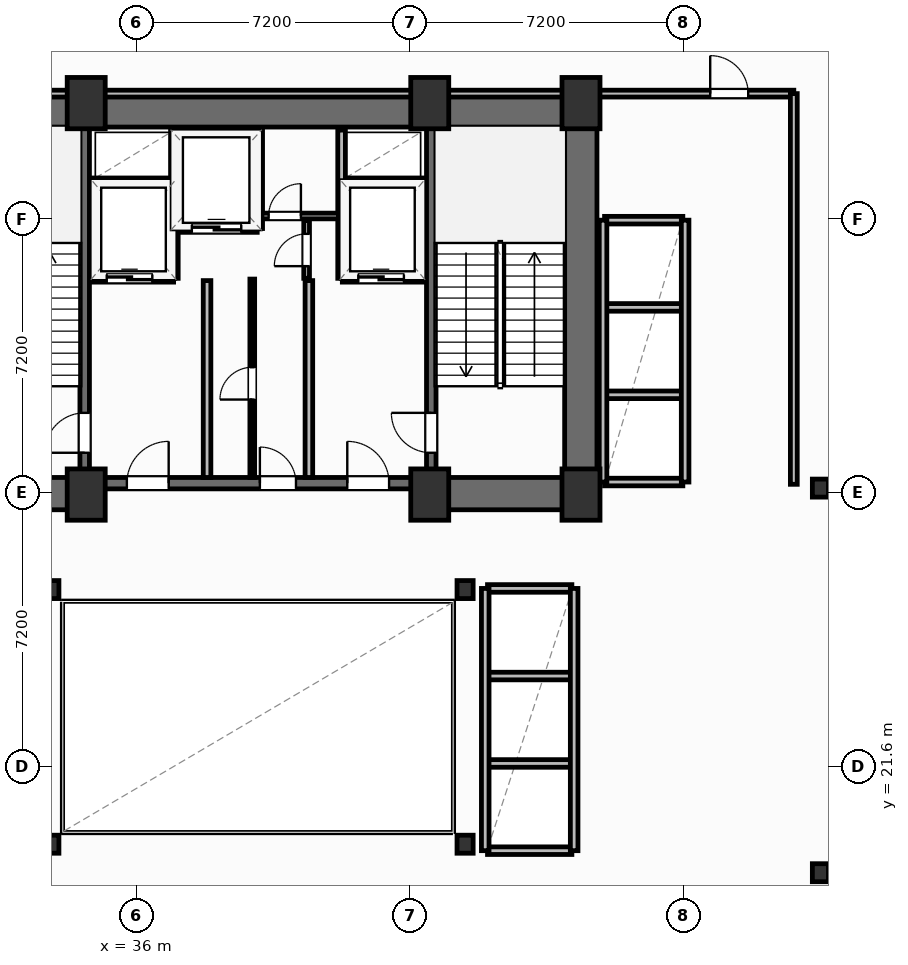
"""IFC4 building model, lengths in metres.
Left out: names, types, materials, properties, quantities, classifications, styles, units other than length and angle.
Written with IfcOpenShell. Run it as: python <this file> out.ifc"""

import sys

from ifc_helpers import new_model, si_unit, direction, frame, frame_2d, origin, origin_2d, place, context, subcontext, project, spatial, rectangle, i_section, extrude, element, fill, save


model = new_model("IFC4")
c1 = context("Model", 3, precision=1e-05, world=origin(), true_north=direction((0.0, 1.0)))
c2 = subcontext(c1, "Body", "Model", "MODEL_VIEW")
j1 = project(units=[si_unit("LENGTHUNIT", "METRE"), si_unit("PLANEANGLEUNIT", "RADIAN")], contexts=[c1])
p1 = place(None, origin())
s1 = spatial("IfcSite", under=j1, at=p1, CompositionType="ELEMENT")
p2 = place(p1, origin())
s2 = spatial("IfcBuilding", under=s1, at=p2, CompositionType="ELEMENT")
p3 = place(p2, frame((0.0, 0.0, 71.4)))
s3 = spatial("IfcBuildingStorey", under=s2, at=p3, CompositionType="ELEMENT", Elevation=71.4)
for number, where, z_axis, x_axis in (
    (1, (34.68, 28.75, 0.0), (0.0, 0.0, 1.0), (1.0, 0.0, 0.0)),
    (2, (43.72, 28.75, 0.0), (0.0, 0.0, 1.0), (1.0, 0.0, 0.0)),
    (3, (47.7, 28.75, 0.0), (0.0, 0.0, 1.0), (1.0, 0.0, 0.0)),
    (4, (34.68, 39.05, 0.0), (0.0, 0.0, 1.0), (1.0, 0.0, 0.0)),
    (5, (43.72, 39.05, 0.0), (0.0, 0.0, 1.0), (1.0, 0.0, 0.0)),
    (6, (47.7, 39.05, 0.0), (0.0, 0.0, 1.0), (1.0, 0.0, 0.0)),
):
    element("IfcColumn", number, at=place(p3, frame(where, z_axis=z_axis, x_axis=x_axis)), inside=s3, PredefinedType="COLUMN", context=c2, shape_type="SweptSolid", body=[
        extrude(rectangle(XDim=1.0, YDim=1.35, at=origin_2d()), origin(), (0.0, 0.0, 1.0), 4.8),
    ])
for number, where, z_axis, x_axis in (
    (7, (33.75, 19.55, 0.0), (0.0, 0.0, 1.0), (1.0, 0.0, 0.0)),
    (8, (44.65, 19.55, 0.0), (0.0, 0.0, 1.0), (1.0, 0.0, 0.0)),
    (9, (33.75, 26.25, 0.0), (0.0, 0.0, 1.0), (1.0, 0.0, 0.0)),
    (10, (44.65, 26.25, 0.0), (0.0, 0.0, 1.0), (1.0, 0.0, 0.0)),
    (11, (54.0, 18.8, 0.0), (0.0, 0.0, 1.0), (1.0, 0.0, 0.0)),
    (12, (54.0, 28.92, 0.0), (0.0, 0.0, 1.0), (1.0, 0.0, 0.0)),
):
    element("IfcColumn", number, at=place(p3, frame(where, z_axis=z_axis, x_axis=x_axis)), inside=s3, PredefinedType="COLUMN", context=c2, shape_type="SweptSolid", body=[
        extrude(i_section(OverallWidth=0.424, OverallDepth=0.474, WebThickness=0.048, FlangeThickness=0.077, FilletRadius=0.025, at=origin_2d()), origin(), (0.0, 0.0, 1.0), 4.8),
    ])
p4 = place(p3, frame((30.28, 38.845, 0.0), z_axis=(0.0, 0.0, 1.0), x_axis=(1.0, 0.0, 0.0)))
e13 = element("IfcWall", 13, at=p4, inside=s3, PredefinedType="SHEAR", context=c2, shape_type="SweptSolid", body=[
    extrude(rectangle(XDim=17.84, YDim=0.85, at=frame_2d((8.92, 0.0))), origin(), (0.0, 0.0, 1.0), 4.55),
])
p5 = place(p3, frame((47.695, 29.2, 0.0), z_axis=(0.0, 0.0, 1.0), x_axis=(0.0, 1.0, 0.0)))
e14 = element("IfcWall", 14, at=p5, inside=s3, PredefinedType="SHEAR", context=c2, shape_type="SweptSolid", body=[
    extrude(rectangle(XDim=9.22, YDim=0.85, at=frame_2d((4.61, 0.0))), origin(), (0.0, 0.0, 1.0), 4.55),
])
for number, where, z_axis, x_axis in (
    (15, (30.28, 28.775, 0.0), (0.0, 0.0, 1.0), (1.0, 0.0, 0.0)),
    (16, (43.6, 28.775, 0.0), (0.0, 0.0, 1.0), (1.0, 0.0, 0.0)),
):
    element("IfcWall", number, at=place(p3, frame(where, z_axis=z_axis, x_axis=x_axis)), inside=s3, PredefinedType="SHEAR", context=c2, shape_type="SweptSolid", body=[
        extrude(rectangle(XDim=4.52, YDim=0.85, at=frame_2d((2.26, 0.0))), origin(), (0.0, 0.0, 1.0), 4.55),
    ])
p6 = place(p3, frame((34.8, 29.05, 0.0), z_axis=(0.0, 0.0, 1.0), x_axis=(1.0, 0.0, 0.0)))
e17 = element("IfcWall", 17, at=p6, inside=s3, PredefinedType="SHEAR", context=c2, shape_type="SweptSolid", body=[
    extrude(rectangle(XDim=8.8, YDim=0.3, at=frame_2d((4.4, 0.0))), origin(), (0.0, 0.0, 1.0), 4.55),
])
p7 = place(p6, frame((0.95, 0.0, 0.0)))
e18 = element("IfcOpeningElement", 18, at=p7, cuts=e17, PredefinedType="OPENING", context=c2, shape_type="SweptSolid", body=[
    extrude(rectangle(XDim=1.1, YDim=2.15, at=frame_2d((0.55, 1.075))), frame((0.0, 0.16, 0.0), z_axis=(0.0, -1.0, 0.0), x_axis=(1.0, 0.0, 0.0)), (0.0, 0.0, 1.0), 0.32),
])
p8 = place(p6, frame((6.75, 0.0, 0.0)))
e19 = element("IfcOpeningElement", 19, at=p8, cuts=e17, PredefinedType="OPENING", context=c2, shape_type="SweptSolid", body=[
    extrude(rectangle(XDim=1.1, YDim=2.15, at=frame_2d((0.55, 1.075))), frame((0.0, 0.16, 0.0), z_axis=(0.0, -1.0, 0.0), x_axis=(1.0, 0.0, 0.0)), (0.0, 0.0, 1.0), 0.32),
])
p9 = place(p6, frame((4.45, 0.0, 0.0)))
e20 = element("IfcOpeningElement", 20, at=p9, cuts=e17, PredefinedType="OPENING", context=c2, shape_type="SweptSolid", body=[
    extrude(rectangle(XDim=0.95, YDim=2.15, at=frame_2d((0.475, 1.075))), frame((0.0, 0.16, 0.0), z_axis=(0.0, -1.0, 0.0), x_axis=(1.0, 0.0, 0.0)), (0.0, 0.0, 1.0), 0.32),
])
p10 = place(p3, frame((34.64, 29.2, 0.0), z_axis=(0.0, 0.0, 1.0), x_axis=(0.0, 1.0, 0.0)))
e21 = element("IfcWall", 21, at=p10, inside=s3, PredefinedType="SHEAR", context=c2, shape_type="SweptSolid", body=[
    extrude(rectangle(XDim=9.22, YDim=0.25, at=frame_2d((4.61, 0.0))), origin(), (0.0, 0.0, 1.0), 4.55),
])
p11 = place(p10, frame((0.65, 0.0, 0.0)))
e22 = element("IfcOpeningElement", 22, at=p11, cuts=e21, PredefinedType="OPENING", context=c2, shape_type="SweptSolid", body=[
    extrude(rectangle(XDim=1.05, YDim=2.15, at=frame_2d((0.525, 1.075))), frame((0.0, 0.135, 0.0), z_axis=(0.0, -1.0, 0.0), x_axis=(1.0, 0.0, 0.0)), (0.0, 0.0, 1.0), 0.27),
])
p12 = place(p3, frame((43.76, 29.2, 0.0), z_axis=(0.0, 0.0, 1.0), x_axis=(0.0, 1.0, 0.0)))
e23 = element("IfcWall", 23, at=p12, inside=s3, PredefinedType="SHEAR", context=c2, shape_type="SweptSolid", body=[
    extrude(rectangle(XDim=9.22, YDim=0.25, at=frame_2d((4.61, 0.0))), origin(), (0.0, 0.0, 1.0), 4.55),
])
p13 = place(p12, frame((0.65, 0.0, 0.0)))
e24 = element("IfcOpeningElement", 24, at=p13, cuts=e23, PredefinedType="OPENING", context=c2, shape_type="SweptSolid", body=[
    extrude(rectangle(XDim=1.05, YDim=2.15, at=frame_2d((0.525, 1.075))), frame((0.0, 0.135, 0.0), z_axis=(0.0, -1.0, 0.0), x_axis=(1.0, 0.0, 0.0)), (0.0, 0.0, 1.0), 0.27),
])
p14 = place(p3, frame((18.646, 55.739, 0.0), z_axis=(0.0, 0.0, 1.0), x_axis=(0.935222250741, -0.354061211825, 0.0)))
e25 = element("IfcWall", 25, at=p14, inside=s3, PredefinedType="SOLIDWALL", context=c2, shape_type="SweptSolid", body=[
    extrude(rectangle(XDim=60.0, YDim=0.22, at=frame_2d((30.0, 0.0))), origin(), (0.0, 0.0, 1.0), 3.83),
])
p15 = place(p14, frame((27.647, 0.0, 0.0)))
e26 = element("IfcOpeningElement", 26, at=p15, cuts=e25, PredefinedType="OPENING", context=c2, shape_type="SweptSolid", body=[
    extrude(rectangle(XDim=1.85, YDim=2.3, at=frame_2d((0.925, 1.15))), frame((0.0, 0.12, 0.0), z_axis=(0.0, -1.0, 0.0), x_axis=(1.0, 0.0, 0.0)), (0.0, 0.0, 1.0), 0.24),
])
p16 = place(p14, frame((0.55, 0.0, 0.75)))
e27 = element("IfcOpeningElement", 27, at=p16, cuts=e25, PredefinedType="OPENING", context=c2, shape_type="SweptSolid", body=[
    extrude(rectangle(XDim=1.65, YDim=1.65, at=frame_2d((0.825, 0.825))), frame((0.0, 0.12, 0.0), z_axis=(0.0, -1.0, 0.0), x_axis=(1.0, 0.0, 0.0)), (0.0, 0.0, 1.0), 0.24),
])
p17 = place(p14, frame((57.8, 0.0, 0.75)))
e28 = element("IfcOpeningElement", 28, at=p17, cuts=e25, PredefinedType="OPENING", context=c2, shape_type="SweptSolid", body=[
    extrude(rectangle(XDim=1.65, YDim=1.65, at=frame_2d((0.825, 0.825))), frame((0.0, 0.12, 0.0), z_axis=(0.0, -1.0, 0.0), x_axis=(1.0, 0.0, 0.0)), (0.0, 0.0, 1.0), 0.24),
])
p18 = place(p3, frame((20.0, 39.3, 0.0), z_axis=(0.0, 0.0, 1.0), x_axis=(1.0, 0.0, 0.0)))
e29 = element("IfcWall", 29, at=p18, inside=s3, PredefinedType="PARTITIONING", context=c2, shape_type="SweptSolid", body=[
    extrude(rectangle(XDim=33.3, YDim=0.18, at=frame_2d((16.65, 0.0))), origin(), (0.0, 0.0, 1.0), 3.68),
])
p19 = place(p18, frame((31.1, 0.0, 0.0)))
e30 = element("IfcOpeningElement", 30, at=p19, cuts=e29, PredefinedType="OPENING", context=c2, shape_type="SweptSolid", body=[
    extrude(rectangle(XDim=1.0, YDim=2.05, at=frame_2d((0.5, 1.025))), frame((0.0, 0.1, 0.0), z_axis=(0.0, -1.0, 0.0), x_axis=(1.0, 0.0, 0.0)), (0.0, 0.0, 1.0), 0.2),
])
p20 = place(p3, frame((53.3, 29.02, 0.0), z_axis=(0.0, 0.0, 1.0), x_axis=(0.0, 1.0, 0.0)))
e31 = element("IfcWall", 31, at=p20, inside=s3, PredefinedType="PARTITIONING", context=c2, shape_type="SweptSolid", body=[
    extrude(rectangle(XDim=10.28, YDim=0.18, at=frame_2d((5.14, 0.0))), origin(), (0.0, 0.0, 1.0), 4.55),
])
for number, where, z_axis, x_axis in (
    (32, (37.86, 29.2, 0.0), (0.0, 0.0, 1.0), (0.0, 1.0, 0.0)),
    (33, (40.54, 29.2, 0.0), (0.0, 0.0, 1.0), (0.0, 1.0, 0.0)),
):
    element("IfcWall", number, at=place(p3, frame(where, z_axis=z_axis, x_axis=x_axis)), inside=s3, PredefinedType="PARTITIONING", context=c2, shape_type="SweptSolid", body=[
        extrude(rectangle(XDim=5.18, YDim=0.2, at=frame_2d((2.59, 0.0))), origin(), (0.0, 0.0, 1.0), 4.55),
    ])
p21 = place(p3, frame((34.8, 34.44, 0.0), z_axis=(0.0, 0.0, 1.0), x_axis=(1.0, 0.0, 0.0)))
e34 = element("IfcWall", 34, at=p21, inside=s3, PredefinedType="PARTITIONING", context=c2, shape_type="SweptSolid", body=[
    extrude(rectangle(XDim=2.18, YDim=0.2, at=frame_2d((1.09, 0.0))), origin(), (0.0, 0.0, 1.0), 4.55),
])
p22 = place(p21, frame((0.42, 0.0, 0.0)))
e35 = element("IfcOpeningElement", 35, at=p22, cuts=e34, PredefinedType="OPENING", context=c2, shape_type="SweptSolid", body=[
    extrude(rectangle(XDim=1.2, YDim=2.2, at=frame_2d((0.6, 1.1))), frame((0.0, 0.11, 0.0), z_axis=(0.0, -1.0, 0.0), x_axis=(1.0, 0.0, 0.0)), (0.0, 0.0, 1.0), 0.22),
])
p23 = place(p3, frame((34.8, 36.98, 0.0), z_axis=(0.0, 0.0, 1.0), x_axis=(1.0, 0.0, 0.0)))
e36 = element("IfcWall", 36, at=p23, inside=s3, PredefinedType="PARTITIONING", context=c2, shape_type="SweptSolid", body=[
    extrude(rectangle(XDim=2.18, YDim=0.2, at=frame_2d((1.09, 0.0))), origin(), (0.0, 0.0, 1.0), 4.55),
])
p24 = place(p3, frame((37.0, 34.44, 0.0), z_axis=(0.0, 0.0, 1.0), x_axis=(0.0, 1.0, 0.0)))
e37 = element("IfcWall", 37, at=p24, inside=s3, PredefinedType="PARTITIONING", context=c2, shape_type="SweptSolid", body=[
    extrude(rectangle(XDim=3.9, YDim=0.2, at=frame_2d((1.95, 0.0))), origin(), (0.0, 0.0, 1.0), 4.55),
])
p25 = place(p3, frame((41.42, 34.44, 0.0), z_axis=(0.0, 0.0, 1.0), x_axis=(1.0, 0.0, 0.0)))
e38 = element("IfcWall", 38, at=p25, inside=s3, PredefinedType="PARTITIONING", context=c2, shape_type="SweptSolid", body=[
    extrude(rectangle(XDim=2.18, YDim=0.2, at=frame_2d((1.09, 0.0))), origin(), (0.0, 0.0, 1.0), 4.55),
])
p26 = place(p25, frame((0.42, 0.0, 0.0)))
e39 = element("IfcOpeningElement", 39, at=p26, cuts=e38, PredefinedType="OPENING", context=c2, shape_type="SweptSolid", body=[
    extrude(rectangle(XDim=1.2, YDim=2.2, at=frame_2d((0.6, 1.1))), frame((0.0, 0.11, 0.0), z_axis=(0.0, -1.0, 0.0), x_axis=(1.0, 0.0, 0.0)), (0.0, 0.0, 1.0), 0.22),
])
p27 = place(p3, frame((41.42, 36.98, 0.0), z_axis=(0.0, 0.0, 1.0), x_axis=(1.0, 0.0, 0.0)))
e40 = element("IfcWall", 40, at=p27, inside=s3, PredefinedType="PARTITIONING", context=c2, shape_type="SweptSolid", body=[
    extrude(rectangle(XDim=2.18, YDim=0.2, at=frame_2d((1.09, 0.0))), origin(), (0.0, 0.0, 1.0), 4.55),
])
p28 = place(p3, frame((41.4, 34.44, 0.0), z_axis=(0.0, 0.0, 1.0), x_axis=(0.0, 1.0, 0.0)))
e41 = element("IfcWall", 41, at=p28, inside=s3, PredefinedType="PARTITIONING", context=c2, shape_type="SweptSolid", body=[
    extrude(rectangle(XDim=3.9, YDim=0.2, at=frame_2d((1.95, 0.0))), origin(), (0.0, 0.0, 1.0), 4.55),
])
p29 = place(p3, frame((37.06, 35.75, 0.0), z_axis=(0.0, 0.0, 1.0), x_axis=(1.0, 0.0, 0.0)))
e42 = element("IfcWall", 42, at=p29, inside=s3, PredefinedType="PARTITIONING", context=c2, shape_type="SweptSolid", body=[
    extrude(rectangle(XDim=2.12, YDim=0.2, at=frame_2d((1.06, 0.0))), origin(), (0.0, 0.0, 1.0), 4.55),
])
p30 = place(p29, frame((0.4, 0.0, 0.0)))
e43 = element("IfcOpeningElement", 43, at=p30, cuts=e42, PredefinedType="OPENING", context=c2, shape_type="SweptSolid", body=[
    extrude(rectangle(XDim=1.3, YDim=2.2, at=frame_2d((0.65, 1.1))), frame((0.0, 0.11, 0.0), z_axis=(0.0, -1.0, 0.0), x_axis=(1.0, 0.0, 0.0)), (0.0, 0.0, 1.0), 0.22),
])
p31 = place(p3, frame((39.22, 35.75, 0.0), z_axis=(0.0, 0.0, 1.0), x_axis=(0.0, 1.0, 0.0)))
e44 = element("IfcWall", 44, at=p31, inside=s3, PredefinedType="PARTITIONING", context=c2, shape_type="SweptSolid", body=[
    extrude(rectangle(XDim=2.59, YDim=0.2, at=frame_2d((1.295, 0.0))), origin(), (0.0, 0.0, 1.0), 4.55),
])
p32 = place(p3, frame((39.3, 36.08, 0.0), z_axis=(0.0, 0.0, 1.0), x_axis=(1.0, 0.0, 0.0)))
e45 = element("IfcWall", 45, at=p32, inside=s3, PredefinedType="PARTITIONING", context=c2, shape_type="SweptSolid", body=[
    extrude(rectangle(XDim=2.02, YDim=0.15, at=frame_2d((1.01, 0.0))), origin(), (0.0, 0.0, 1.0), 4.55),
])
p33 = place(p32, frame((0.18, 0.0, 0.0)))
e46 = element("IfcOpeningElement", 46, at=p33, cuts=e45, PredefinedType="OPENING", context=c2, shape_type="SweptSolid", body=[
    extrude(rectangle(XDim=0.85, YDim=2.05, at=frame_2d((0.425, 1.025))), frame((0.0, 0.085, 0.0), z_axis=(0.0, -1.0, 0.0), x_axis=(1.0, 0.0, 0.0)), (0.0, 0.0, 1.0), 0.17),
])
p34 = place(p3, frame((40.48, 34.44, 0.0), z_axis=(0.0, 0.0, 1.0), x_axis=(0.0, 1.0, 0.0)))
e47 = element("IfcWall", 47, at=p34, inside=s3, PredefinedType="PARTITIONING", context=c2, shape_type="SweptSolid", body=[
    extrude(rectangle(XDim=1.52, YDim=0.15, at=frame_2d((0.76, 0.0))), origin(), (0.0, 0.0, 1.0), 4.55),
])
p35 = place(p34, frame((0.32, 0.0, 0.0)))
e48 = element("IfcOpeningElement", 48, at=p35, cuts=e47, PredefinedType="OPENING", context=c2, shape_type="SweptSolid", body=[
    extrude(rectangle(XDim=0.85, YDim=2.05, at=frame_2d((0.425, 1.025))), frame((0.0, 0.085, 0.0), z_axis=(0.0, -1.0, 0.0), x_axis=(1.0, 0.0, 0.0)), (0.0, 0.0, 1.0), 0.17),
])
p36 = place(p3, frame((39.05, 29.2, 0.0), z_axis=(0.0, 0.0, 1.0), x_axis=(0.0, 1.0, 0.0)))
e49 = element("IfcWall", 49, at=p36, inside=s3, PredefinedType="PARTITIONING", context=c2, shape_type="SweptSolid", body=[
    extrude(rectangle(XDim=5.22, YDim=0.125, at=frame_2d((2.61, 0.0))), origin(), (0.0, 0.0, 1.0), 4.55),
])
p37 = place(p36, frame((2.05, 0.0, 0.0)))
e50 = element("IfcOpeningElement", 50, at=p37, cuts=e49, PredefinedType="OPENING", context=c2, shape_type="SweptSolid", body=[
    extrude(rectangle(XDim=0.85, YDim=2.05, at=frame_2d((0.425, 1.025))), frame((0.0, 0.073, 0.0), z_axis=(0.0, -1.0, 0.0), x_axis=(1.0, 0.0, 0.0)), (0.0, 0.0, 1.0), 0.145),
])
for number, where, z_axis, x_axis in (
    (51, (48.32, 31.375, 0.0), (0.0, 0.0, 1.0), (1.0, 0.0, 0.0)),
    (52, (48.32, 33.675, 0.0), (0.0, 0.0, 1.0), (1.0, 0.0, 0.0)),
):
    element("IfcWall", number, at=place(p3, frame(where, z_axis=z_axis, x_axis=x_axis)), inside=s3, PredefinedType="PARTITIONING", context=c2, shape_type="SweptSolid", body=[
        extrude(rectangle(XDim=2.06, YDim=0.2, at=frame_2d((1.03, 0.0))), origin(), (0.0, 0.0, 1.0), 4.55),
    ])
p38 = place(p3, frame((48.32, 29.08, 0.0), z_axis=(0.0, 0.0, 1.0), x_axis=(1.0, 0.0, 0.0)))
e53 = element("IfcWall", 53, at=p38, inside=s3, PredefinedType="PARTITIONING", context=c2, shape_type="SweptSolid", body=[
    extrude(rectangle(XDim=2.06, YDim=0.2, at=frame_2d((1.03, 0.0))), origin(), (0.0, 0.0, 1.0), 3.762),
])
p39 = place(p3, frame((48.32, 35.97, 0.0), z_axis=(0.0, 0.0, 1.0), x_axis=(1.0, 0.0, 0.0)))
e54 = element("IfcWall", 54, at=p39, inside=s3, PredefinedType="PARTITIONING", context=c2, shape_type="SweptSolid", body=[
    extrude(rectangle(XDim=2.06, YDim=0.2, at=frame_2d((1.03, 0.0))), origin(), (0.0, 0.0, 1.0), 4.55),
])
for number, where, z_axis, x_axis in (
    (55, (48.28, 29.08, 0.0), (0.0, 0.0, 1.0), (0.0, 1.0, 0.0)),
    (56, (50.44, 29.08, 0.0), (0.0, 0.0, 1.0), (0.0, 1.0, 0.0)),
):
    element("IfcWall", number, at=place(p3, frame(where, z_axis=z_axis, x_axis=x_axis)), inside=s3, PredefinedType="PARTITIONING", context=c2, shape_type="SweptSolid", body=[
        extrude(rectangle(XDim=6.89, YDim=0.2, at=frame_2d((3.445, 0.0))), origin(), (0.0, 0.0, 1.0), 4.55),
    ])
for number, where, z_axis, x_axis in (
    (57, (45.24, 21.675, 0.0), (0.0, 0.0, 1.0), (1.0, 0.0, 0.0)),
    (58, (45.24, 23.975, 0.0), (0.0, 0.0, 1.0), (1.0, 0.0, 0.0)),
):
    element("IfcWall", number, at=place(p3, frame(where, z_axis=z_axis, x_axis=x_axis)), inside=s3, PredefinedType="PARTITIONING", context=c2, shape_type="SweptSolid", body=[
        extrude(rectangle(XDim=2.22, YDim=0.2, at=frame_2d((1.11, 0.0))), origin(), (0.0, 0.0, 1.0), 4.55),
    ])
p40 = place(p3, frame((45.24, 19.38, 0.0), z_axis=(0.0, 0.0, 1.0), x_axis=(1.0, 0.0, 0.0)))
e59 = element("IfcWall", 59, at=p40, inside=s3, PredefinedType="PARTITIONING", context=c2, shape_type="SweptSolid", body=[
    extrude(rectangle(XDim=2.22, YDim=0.2, at=frame_2d((1.11, 0.0))), origin(), (0.0, 0.0, 1.0), 3.762),
])
p41 = place(p3, frame((45.24, 26.28, 0.0), z_axis=(0.0, 0.0, 1.0), x_axis=(1.0, 0.0, 0.0)))
e60 = element("IfcWall", 60, at=p41, inside=s3, PredefinedType="PARTITIONING", context=c2, shape_type="SweptSolid", body=[
    extrude(rectangle(XDim=2.22, YDim=0.2, at=frame_2d((1.11, 0.0))), origin(), (0.0, 0.0, 1.0), 4.55),
])
for number, where, z_axis, x_axis in (
    (61, (45.18, 19.38, 0.0), (0.0, 0.0, 1.0), (0.0, 1.0, 0.0)),
    (62, (47.52, 19.38, 0.0), (0.0, 0.0, 1.0), (0.0, 1.0, 0.0)),
):
    element("IfcWall", number, at=place(p3, frame(where, z_axis=z_axis, x_axis=x_axis)), inside=s3, PredefinedType="PARTITIONING", context=c2, shape_type="SweptSolid", body=[
        extrude(rectangle(XDim=6.9, YDim=0.2, at=frame_2d((3.45, 0.0))), origin(), (0.0, 0.0, 1.0), 4.55),
    ])
p42 = place(p19, origin())
e63 = element("IfcDoor", 63, at=p42, inside=s3, OperationType="SINGLE_SWING_LEFT", PredefinedType="DOOR", context=c2, shape_type="SweptSolid", body=[
    extrude(rectangle(XDim=1.0, YDim=2.05, at=frame_2d((0.5, 1.025))), frame((0.0, 0.025, 0.0), z_axis=(0.0, -1.0, 0.0), x_axis=(1.0, 0.0, 0.0)), (0.0, 0.0, 1.0), 0.05),
])
fill(e30, e63)
p43 = place(p11, origin())
e64 = element("IfcDoor", 64, at=p43, inside=s3, OperationType="SINGLE_SWING_LEFT", PredefinedType="DOOR", context=c2, shape_type="SweptSolid", body=[
    extrude(rectangle(XDim=1.05, YDim=2.15, at=frame_2d((0.525, 1.075))), frame((0.0, 0.025, 0.0), z_axis=(0.0, -1.0, 0.0), x_axis=(1.0, 0.0, 0.0)), (0.0, 0.0, 1.0), 0.05),
])
fill(e22, e64)
p44 = place(p13, origin())
e65 = element("IfcDoor", 65, at=p44, inside=s3, OperationType="SINGLE_SWING_RIGHT", PredefinedType="DOOR", context=c2, shape_type="SweptSolid", body=[
    extrude(rectangle(XDim=1.05, YDim=2.15, at=frame_2d((0.525, 1.075))), frame((0.0, 0.025, 0.0), z_axis=(0.0, -1.0, 0.0), x_axis=(1.0, 0.0, 0.0)), (0.0, 0.0, 1.0), 0.05),
])
fill(e24, e65)
p45 = place(p7, origin())
e66 = element("IfcDoor", 66, at=p45, inside=s3, OperationType="SINGLE_SWING_RIGHT", PredefinedType="DOOR", context=c2, shape_type="SweptSolid", body=[
    extrude(rectangle(XDim=1.1, YDim=2.15, at=frame_2d((0.55, 1.075))), frame((0.0, 0.025, 0.0), z_axis=(0.0, -1.0, 0.0), x_axis=(1.0, 0.0, 0.0)), (0.0, 0.0, 1.0), 0.05),
])
fill(e18, e66)
p46 = place(p8, origin())
e67 = element("IfcDoor", 67, at=p46, inside=s3, OperationType="SINGLE_SWING_LEFT", PredefinedType="DOOR", context=c2, shape_type="SweptSolid", body=[
    extrude(rectangle(XDim=1.1, YDim=2.15, at=frame_2d((0.55, 1.075))), frame((0.0, 0.025, 0.0), z_axis=(0.0, -1.0, 0.0), x_axis=(1.0, 0.0, 0.0)), (0.0, 0.0, 1.0), 0.05),
])
fill(e19, e67)
p47 = place(p22, origin())
e68 = element("IfcDoor", 68, at=p47, inside=s3, OperationType="SLIDING_TO_LEFT", PredefinedType="DOOR", context=c2, shape_type="SweptSolid", body=[
    extrude(rectangle(XDim=1.2, YDim=2.2, at=frame_2d((0.6, 1.1))), frame((0.0, 0.025, 0.0), z_axis=(0.0, -1.0, 0.0), x_axis=(1.0, 0.0, 0.0)), (0.0, 0.0, 1.0), 0.05),
])
fill(e35, e68)
p48 = place(p26, origin())
e69 = element("IfcDoor", 69, at=p48, inside=s3, OperationType="SLIDING_TO_LEFT", PredefinedType="DOOR", context=c2, shape_type="SweptSolid", body=[
    extrude(rectangle(XDim=1.2, YDim=2.2, at=frame_2d((0.6, 1.1))), frame((0.0, 0.025, 0.0), z_axis=(0.0, -1.0, 0.0), x_axis=(1.0, 0.0, 0.0)), (0.0, 0.0, 1.0), 0.05),
])
fill(e39, e69)
p49 = place(p30, origin())
e70 = element("IfcDoor", 70, at=p49, inside=s3, OperationType="SLIDING_TO_LEFT", PredefinedType="DOOR", context=c2, shape_type="SweptSolid", body=[
    extrude(rectangle(XDim=1.3, YDim=2.2, at=frame_2d((0.65, 1.1))), frame((0.0, 0.025, 0.0), z_axis=(0.0, -1.0, 0.0), x_axis=(1.0, 0.0, 0.0)), (0.0, 0.0, 1.0), 0.05),
])
fill(e43, e70)
p50 = place(p33, origin())
e71 = element("IfcDoor", 71, at=p50, inside=s3, OperationType="SINGLE_SWING_RIGHT", PredefinedType="DOOR", context=c2, shape_type="SweptSolid", body=[
    extrude(rectangle(XDim=0.85, YDim=2.05, at=frame_2d((0.425, 1.025))), frame((0.0, 0.025, 0.0), z_axis=(0.0, -1.0, 0.0), x_axis=(1.0, 0.0, 0.0)), (0.0, 0.0, 1.0), 0.05),
])
fill(e46, e71)
p51 = place(p35, origin())
e72 = element("IfcDoor", 72, at=p51, inside=s3, OperationType="SINGLE_SWING_LEFT", PredefinedType="DOOR", context=c2, shape_type="SweptSolid", body=[
    extrude(rectangle(XDim=0.85, YDim=2.05, at=frame_2d((0.425, 1.025))), frame((0.0, 0.025, 0.0), z_axis=(0.0, -1.0, 0.0), x_axis=(1.0, 0.0, 0.0)), (0.0, 0.0, 1.0), 0.05),
])
fill(e48, e72)
p52 = place(p37, origin())
e73 = element("IfcDoor", 73, at=p52, inside=s3, OperationType="SINGLE_SWING_LEFT", PredefinedType="DOOR", context=c2, shape_type="SweptSolid", body=[
    extrude(rectangle(XDim=0.85, YDim=2.05, at=frame_2d((0.425, 1.025))), frame((0.0, 0.025, 0.0), z_axis=(0.0, -1.0, 0.0), x_axis=(1.0, 0.0, 0.0)), (0.0, 0.0, 1.0), 0.05),
])
fill(e50, e73)
p53 = place(p9, origin())
e74 = element("IfcDoor", 74, at=p53, inside=s3, OperationType="SINGLE_SWING_LEFT", PredefinedType="DOOR", context=c2, shape_type="SweptSolid", body=[
    extrude(rectangle(XDim=0.95, YDim=2.15, at=frame_2d((0.475, 1.075))), frame((0.0, 0.025, 0.0), z_axis=(0.0, -1.0, 0.0), x_axis=(1.0, 0.0, 0.0)), (0.0, 0.0, 1.0), 0.05),
])
fill(e20, e74)
save(model, sys.argv[1])
